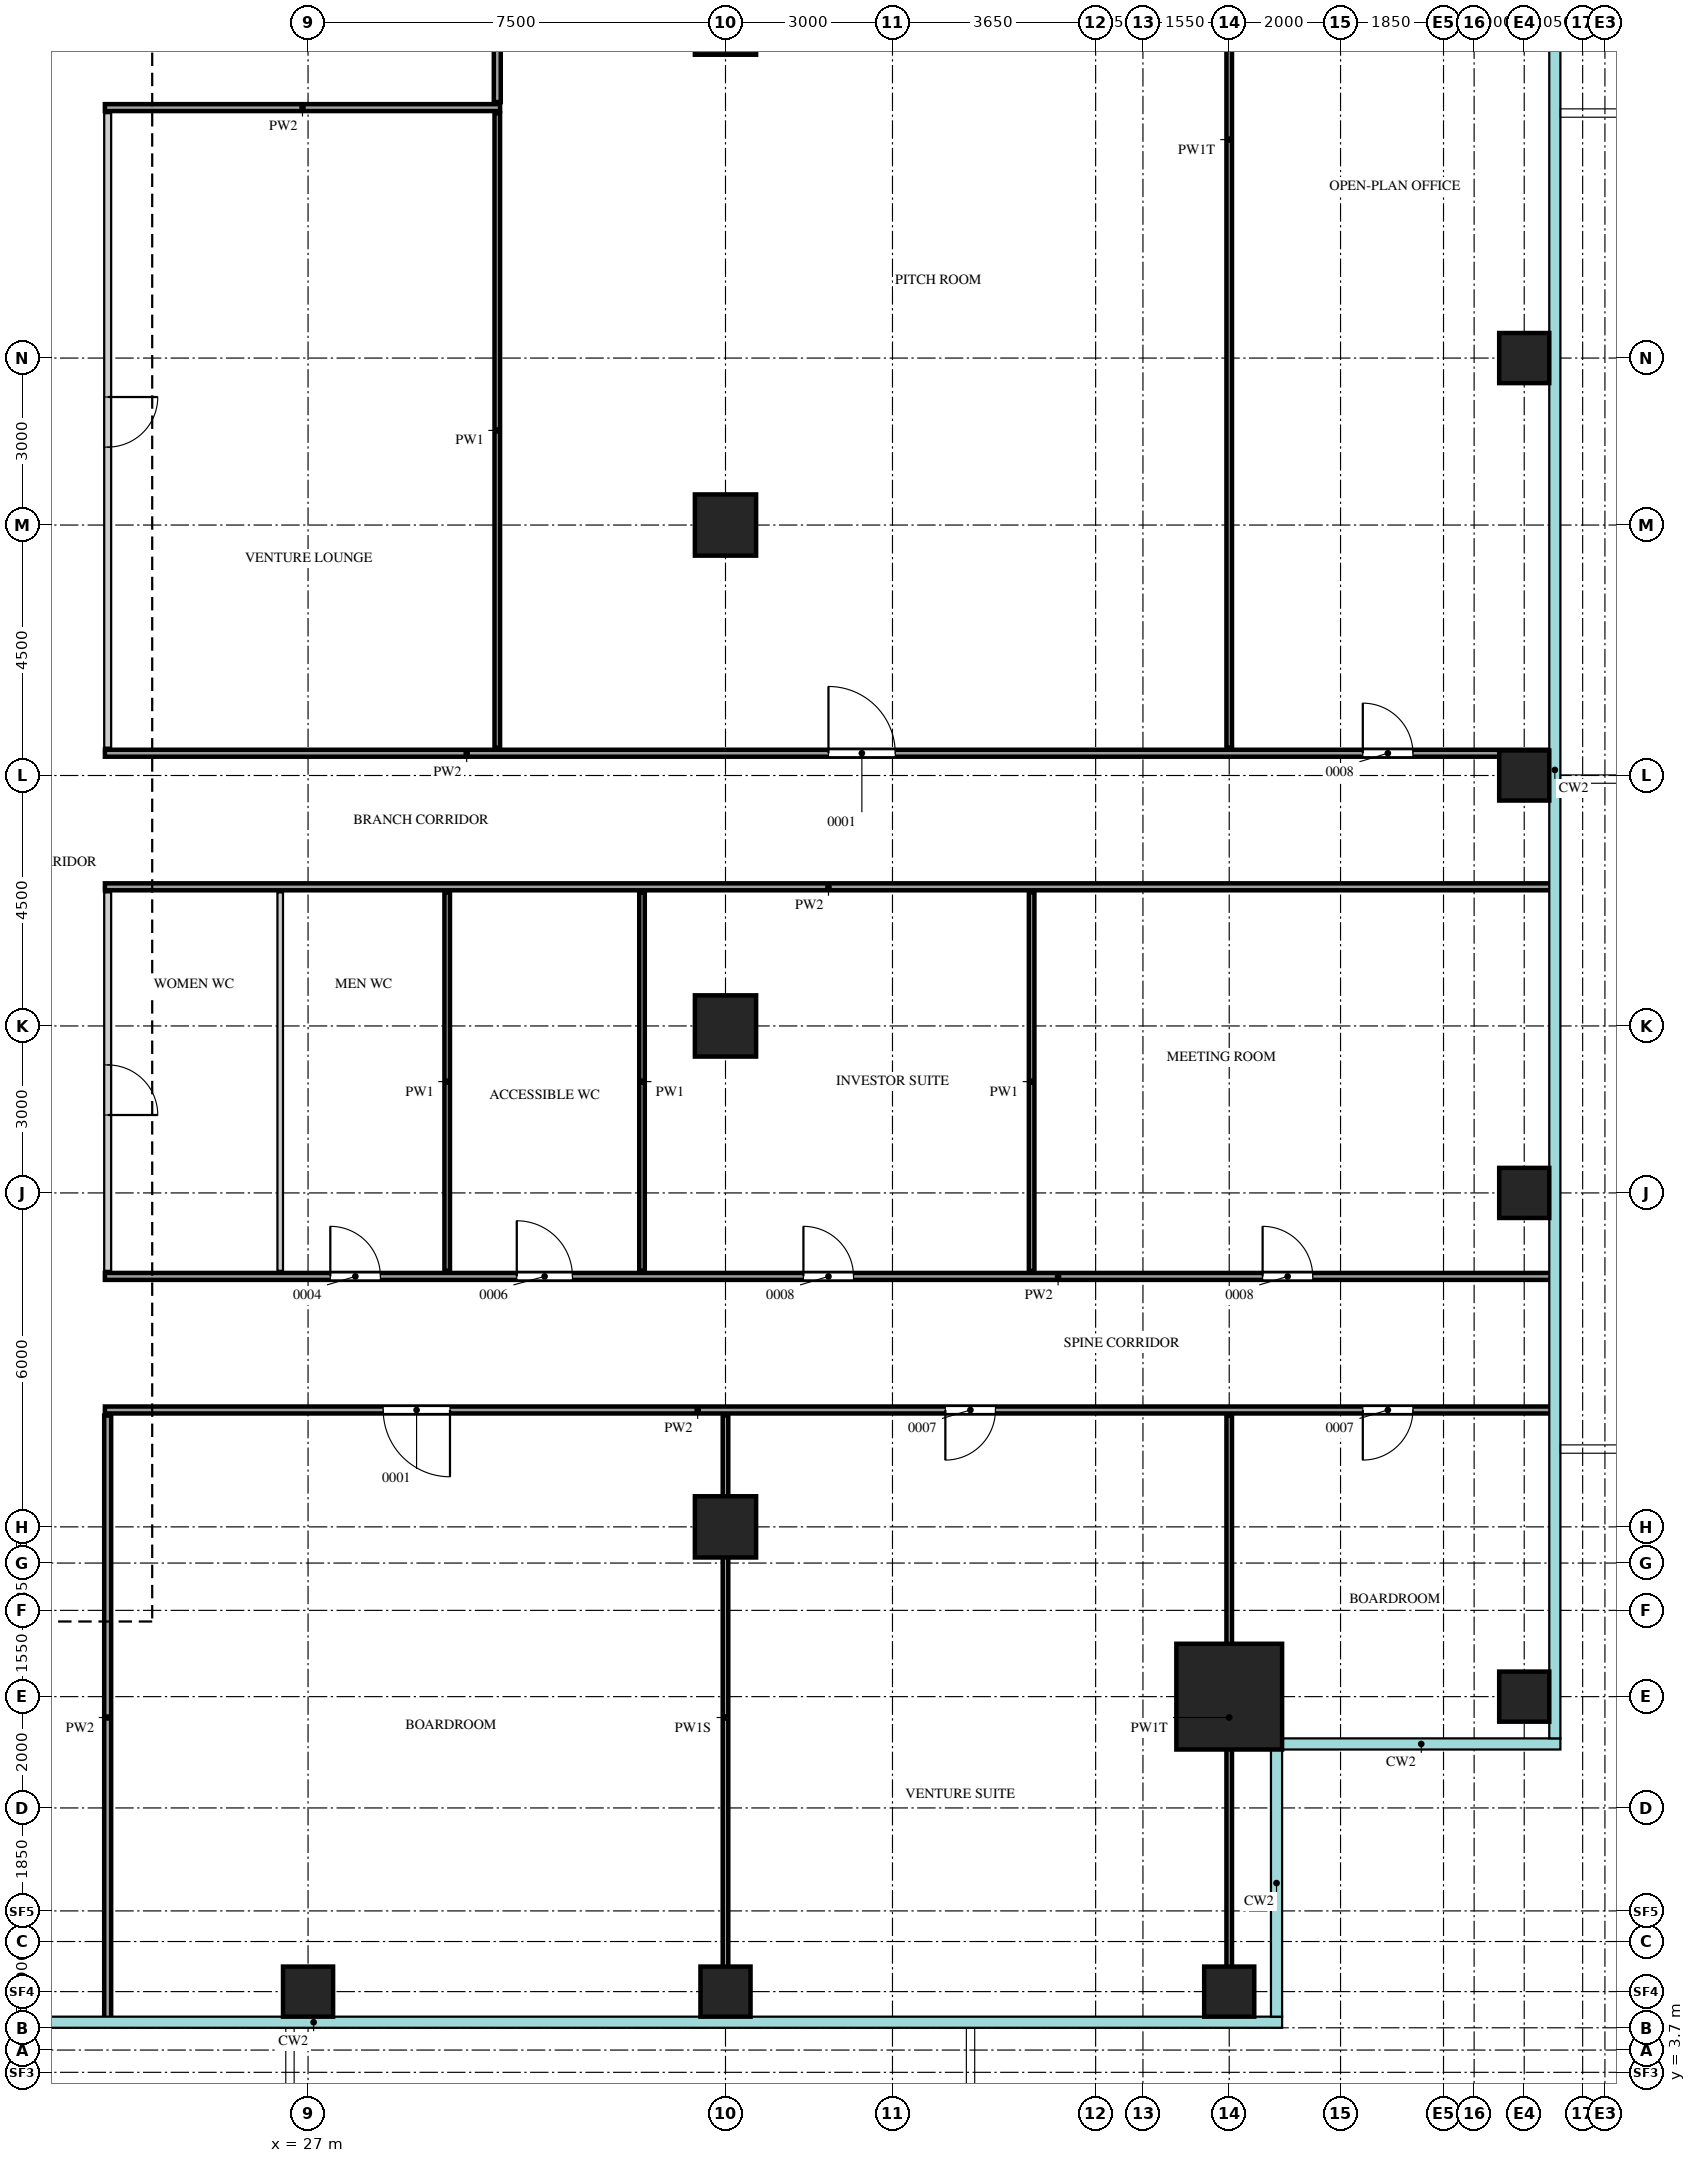
"""IFC4 building model, lengths in metres.
Left out: names, types, materials, properties, quantities, classifications, styles, units other than length and angle.
Written with IfcOpenShell. Run it as: python <this file> out.ifc"""

import sys

from ifc_helpers import new_model, si_unit, direction, frame, frame_2d, origin, origin_2d, place, context, subcontext, project, spatial, rectangle, extrude, source, transform, mapped, element, fill, save


model = new_model("IFC4")
c1 = context("Model", 3, precision=1e-05, world=origin(), true_north=direction((0.0, 1.0)))
c2 = subcontext(c1, "Body", "Model", "MODEL_VIEW")
j1 = project(units=[si_unit("LENGTHUNIT", "METRE"), si_unit("PLANEANGLEUNIT", "RADIAN")], contexts=[c1])
p1 = place(None, origin())
s1 = spatial("IfcSite", under=j1, at=p1, CompositionType="ELEMENT")
p2 = place(p1, origin())
s2 = spatial("IfcBuilding", under=s1, at=p2, CompositionType="ELEMENT")
p3 = place(p2, frame((0.0, 0.0, 242.2)))
s3 = spatial("IfcBuildingStorey", under=s2, at=p3, CompositionType="ELEMENT", Elevation=242.2)
m1 = source(origin(), c2, "Body", "SweptSolid", [
    extrude(rectangle(XDim=1.9, YDim=1.9, at=origin_2d()), origin(), (0.0, 0.0, 1.0), 4.0),
])
p4 = place(p3, frame((43.55, 10.45, 0.0), z_axis=(0.0, 0.0, 1.0), x_axis=(1.0, 0.0, 0.0)))
e1 = element("IfcColumn", 1, at=p4, inside=s3, PredefinedType="COLUMN", context=c2, shape_type="MappedRepresentation", body=[
    mapped(m1, transform((0.0, 0.0, 0.0))),
])
m2 = source(origin(), c2, "Body", "SweptSolid", [
    extrude(rectangle(XDim=0.9, YDim=0.9, at=origin_2d()), origin(), (0.0, 0.0, 1.0), 3.75),
])
for number, where, z_axis, x_axis in (
    (2, (27.0, 5.15, 0.0), (0.0, 0.0, 1.0), (1.0, 0.0, 0.0)),
    (3, (34.5, 5.15, 0.0), (0.0, 0.0, 1.0), (1.0, 0.0, 0.0)),
    (4, (43.55, 5.15, 0.0), (0.0, 0.0, 1.0), (1.0, 0.0, 0.0)),
    (5, (48.85, 10.45, 0.0), (0.0, 0.0, 1.0), (1.0, 0.0, 0.0)),
    (6, (48.85, 19.5, 0.0), (0.0, 0.0, 1.0), (1.0, 0.0, 0.0)),
    (7, (48.85, 27.0, 0.0), (0.0, 0.0, 1.0), (1.0, 0.0, 0.0)),
    (8, (48.85, 34.5, 0.0), (0.0, 0.0, 1.0), (1.0, 0.0, 0.0)),
):
    element("IfcColumn", number, at=place(p3, frame(where, z_axis=z_axis, x_axis=x_axis)), inside=s3, PredefinedType="COLUMN", context=c2, shape_type="MappedRepresentation", body=[
        mapped(m2, transform((0.0, 0.0, 0.0))),
    ])
m3 = source(origin(), c2, "Body", "SweptSolid", [
    extrude(rectangle(XDim=1.1, YDim=1.1, at=origin_2d()), origin(), (0.0, 0.0, 1.0), 3.75),
])
for number, where, z_axis, x_axis in (
    (9, (34.5, 13.5, 0.0), (0.0, 0.0, 1.0), (1.0, 0.0, 0.0)),
    (10, (34.5, 22.5, 0.0), (0.0, 0.0, 1.0), (1.0, 0.0, 0.0)),
    (11, (34.5, 31.5, 0.0), (0.0, 0.0, 1.0), (1.0, 0.0, 0.0)),
    (12, (34.5, 40.5, 0.0), (0.0, 0.0, 1.0), (1.0, 0.0, 0.0)),
):
    element("IfcColumn", number, at=place(p3, frame(where, z_axis=z_axis, x_axis=x_axis)), inside=s3, PredefinedType="COLUMN", context=c2, shape_type="MappedRepresentation", body=[
        mapped(m3, transform((0.0, 0.0, 0.0))),
    ])
m4 = source(origin(), c2, "Body", "SweptSolid", [
    extrude(rectangle(XDim=10.85, YDim=0.125, at=frame_2d((5.425, 0.0))), origin(), (0.0, 0.0, 1.0), 3.8),
])
p5 = place(p3, frame((23.4, 4.65, 0.0), z_axis=(0.0, 0.0, 1.0), x_axis=(0.0, 1.0, 0.0)))
e13 = element("IfcWall", 13, at=p5, inside=s3, PredefinedType="PARTITIONING", context=c2, shape_type="MappedRepresentation", body=[
    mapped(m4, transform((0.0, 0.0, 0.0))),
])
m5 = source(origin(), c2, "Body", "SweptSolid", [
    extrude(rectangle(XDim=10.85, YDim=0.1, at=frame_2d((5.425, 0.0))), origin(), (0.0, 0.0, 1.0), 3.35),
])
p6 = place(p3, frame((34.5, 4.65, 0.0), z_axis=(0.0, 0.0, 1.0), x_axis=(0.0, 1.0, 0.0)))
e14 = element("IfcWall", 14, at=p6, inside=s3, PredefinedType="PARTITIONING", context=c2, shape_type="MappedRepresentation", body=[
    mapped(m5, transform((0.0, 0.0, 0.0))),
])
m6 = source(origin(), c2, "Body", "SweptSolid", [
    extrude(rectangle(XDim=10.85, YDim=0.1, at=frame_2d((5.425, 0.0))), origin(), (0.0, 0.0, 1.0), 3.3),
])
p7 = place(p3, frame((43.55, 4.65, 0.0), z_axis=(0.0, 0.0, 1.0), x_axis=(0.0, 1.0, 0.0)))
e15 = element("IfcWall", 15, at=p7, inside=s3, PredefinedType="PARTITIONING", context=c2, shape_type="MappedRepresentation", body=[
    mapped(m6, transform((0.0, 0.0, 0.0))),
])
m7 = source(origin(), c2, "Body", "SweptSolid", [
    extrude(rectangle(XDim=26.0, YDim=0.125, at=frame_2d((13.0, 0.0))), origin(), (0.0, 0.0, 1.0), 3.8),
])
p8 = place(p3, frame((23.35, 15.6, 0.0), z_axis=(0.0, 0.0, 1.0), x_axis=(1.0, 0.0, 0.0)))
e16 = element("IfcWall", 16, at=p8, inside=s3, PredefinedType="PARTITIONING", context=c2, shape_type="MappedRepresentation", body=[
    mapped(m7, transform((0.0, 0.0, 0.0))),
])
m8 = source(origin(), c2, "Body", "SweptSolid", [
    extrude(rectangle(XDim=1.2, YDim=2.1, at=frame_2d((0.6, 1.05))), frame((0.0, 0.073, 0.0), z_axis=(0.0, -1.0, 0.0), x_axis=(1.0, 0.0, 0.0)), (0.0, 0.0, 1.0), 0.145),
])
p9 = place(p8, frame((5.0, 0.0, 0.0)))
e17 = element("IfcOpeningElement", 17, at=p9, cuts=e16, PredefinedType="OPENING", context=c2, shape_type="MappedRepresentation", body=[
    mapped(m8, transform((0.0, 0.0, 0.0))),
])
m9 = source(origin(), c2, "Body", "SweptSolid", [
    extrude(rectangle(XDim=0.9, YDim=2.1, at=frame_2d((0.45, 1.05))), frame((0.0, 0.073, 0.0), z_axis=(0.0, -1.0, 0.0), x_axis=(1.0, 0.0, 0.0)), (0.0, 0.0, 1.0), 0.145),
])
p10 = place(p8, frame((15.1, 0.0, 0.0)))
e18 = element("IfcOpeningElement", 18, at=p10, cuts=e16, PredefinedType="OPENING", context=c2, shape_type="MappedRepresentation", body=[
    mapped(m9, transform((0.0, 0.0, 0.0))),
])
p11 = place(p8, frame((22.6, 0.0, 0.0)))
e19 = element("IfcOpeningElement", 19, at=p11, cuts=e16, PredefinedType="OPENING", context=c2, shape_type="MappedRepresentation", body=[
    mapped(m9, transform((0.0, 0.0, 0.0))),
])
p12 = place(p3, frame((23.35, 18.0, 0.0), z_axis=(0.0, 0.0, 1.0), x_axis=(1.0, 0.0, 0.0)))
e20 = element("IfcWall", 20, at=p12, inside=s3, PredefinedType="PARTITIONING", context=c2, shape_type="MappedRepresentation", body=[
    mapped(m7, transform((0.0, 0.0, 0.0))),
])
p13 = place(p12, frame((4.05, 0.0, 0.0)))
e21 = element("IfcOpeningElement", 21, at=p13, cuts=e20, PredefinedType="OPENING", context=c2, shape_type="MappedRepresentation", body=[
    mapped(m9, transform((0.0, 0.0, 0.0))),
])
m10 = source(origin(), c2, "Body", "SweptSolid", [
    extrude(rectangle(XDim=1.0, YDim=2.1, at=frame_2d((0.5, 1.05))), frame((0.0, 0.073, 0.0), z_axis=(0.0, -1.0, 0.0), x_axis=(1.0, 0.0, 0.0)), (0.0, 0.0, 1.0), 0.145),
])
p14 = place(p12, frame((7.4, 0.0, 0.0)))
e22 = element("IfcOpeningElement", 22, at=p14, cuts=e20, PredefinedType="OPENING", context=c2, shape_type="MappedRepresentation", body=[
    mapped(m10, transform((0.0, 0.0, 0.0))),
])
p15 = place(p12, frame((12.55, 0.0, 0.0)))
e23 = element("IfcOpeningElement", 23, at=p15, cuts=e20, PredefinedType="OPENING", context=c2, shape_type="MappedRepresentation", body=[
    mapped(m9, transform((0.0, 0.0, 0.0))),
])
p16 = place(p12, frame((20.8, 0.0, 0.0)))
e24 = element("IfcOpeningElement", 24, at=p16, cuts=e20, PredefinedType="OPENING", context=c2, shape_type="MappedRepresentation", body=[
    mapped(m9, transform((0.0, 0.0, 0.0))),
])
m11 = source(origin(), c2, "Body", "SweptSolid", [
    extrude(rectangle(XDim=6.8, YDim=0.125, at=frame_2d((3.4, 0.0))), origin(), (0.0, 0.0, 1.0), 3.8),
])
p17 = place(p3, frame((23.4, 18.1, 0.0), z_axis=(0.0, 0.0, 1.0), x_axis=(0.0, 1.0, 0.0)))
e25 = element("IfcWall", 25, at=p17, inside=s3, PredefinedType="PARTITIONING", context=c2, shape_type="MappedRepresentation", body=[
    mapped(m11, transform((0.0, 0.0, 0.0))),
])
p18 = place(p17, frame((2.8, 0.0, 0.0)))
e26 = element("IfcOpeningElement", 26, at=p18, cuts=e25, PredefinedType="OPENING", context=c2, shape_type="MappedRepresentation", body=[
    mapped(m9, transform((0.0, 0.0, 0.0))),
])
m12 = source(origin(), c2, "Body", "SweptSolid", [
    extrude(rectangle(XDim=6.8, YDim=0.1, at=frame_2d((3.4, 0.0))), origin(), (0.0, 0.0, 1.0), 3.8),
])
for number, where, z_axis, x_axis in (
    (27, (26.5, 18.1, 0.0), (0.0, 0.0, 1.0), (0.0, 1.0, 0.0)),
    (28, (29.5, 18.1, 0.0), (0.0, 0.0, 1.0), (0.0, 1.0, 0.0)),
    (29, (33.0, 18.1, 0.0), (0.0, 0.0, 1.0), (0.0, 1.0, 0.0)),
    (30, (40.0, 18.1, 0.0), (0.0, 0.0, 1.0), (0.0, 1.0, 0.0)),
):
    element("IfcWall", number, at=place(p3, frame(where, z_axis=z_axis, x_axis=x_axis)), inside=s3, PredefinedType="PARTITIONING", context=c2, shape_type="MappedRepresentation", body=[
        mapped(m12, transform((0.0, 0.0, 0.0))),
    ])
p19 = place(p3, frame((23.35, 25.0, 0.0), z_axis=(0.0, 0.0, 1.0), x_axis=(1.0, 0.0, 0.0)))
e31 = element("IfcWall", 31, at=p19, inside=s3, PredefinedType="PARTITIONING", context=c2, shape_type="MappedRepresentation", body=[
    mapped(m7, transform((0.0, 0.0, 0.0))),
])
p20 = place(p3, frame((23.35, 27.4, 0.0), z_axis=(0.0, 0.0, 1.0), x_axis=(1.0, 0.0, 0.0)))
e32 = element("IfcWall", 32, at=p20, inside=s3, PredefinedType="PARTITIONING", context=c2, shape_type="MappedRepresentation", body=[
    mapped(m7, transform((0.0, 0.0, 0.0))),
])
p21 = place(p20, frame((13.0, 0.0, 0.0)))
e33 = element("IfcOpeningElement", 33, at=p21, cuts=e32, PredefinedType="OPENING", context=c2, shape_type="MappedRepresentation", body=[
    mapped(m8, transform((0.0, 0.0, 0.0))),
])
p22 = place(p20, frame((22.6, 0.0, 0.0)))
e34 = element("IfcOpeningElement", 34, at=p22, cuts=e32, PredefinedType="OPENING", context=c2, shape_type="MappedRepresentation", body=[
    mapped(m9, transform((0.0, 0.0, 0.0))),
])
m13 = source(origin(), c2, "Body", "SweptSolid", [
    extrude(rectangle(XDim=11.4, YDim=0.125, at=frame_2d((5.7, 0.0))), origin(), (0.0, 0.0, 1.0), 3.8),
])
p23 = place(p3, frame((23.4, 27.5, 0.0), z_axis=(0.0, 0.0, 1.0), x_axis=(0.0, 1.0, 0.0)))
e35 = element("IfcWall", 35, at=p23, inside=s3, PredefinedType="PARTITIONING", context=c2, shape_type="MappedRepresentation", body=[
    mapped(m13, transform((0.0, 0.0, 0.0))),
])
p24 = place(p23, frame((5.4, 0.0, 0.0)))
e36 = element("IfcOpeningElement", 36, at=p24, cuts=e35, PredefinedType="OPENING", context=c2, shape_type="MappedRepresentation", body=[
    mapped(m9, transform((0.0, 0.0, 0.0))),
])
m14 = source(origin(), c2, "Body", "SweptSolid", [
    extrude(rectangle(XDim=11.4, YDim=0.1, at=frame_2d((5.7, 0.0))), origin(), (0.0, 0.0, 1.0), 3.8),
])
p25 = place(p3, frame((30.4, 27.5, 0.0), z_axis=(0.0, 0.0, 1.0), x_axis=(0.0, 1.0, 0.0)))
e37 = element("IfcWall", 37, at=p25, inside=s3, PredefinedType="PARTITIONING", context=c2, shape_type="MappedRepresentation", body=[
    mapped(m14, transform((0.0, 0.0, 0.0))),
])
m15 = source(origin(), c2, "Body", "SweptSolid", [
    extrude(rectangle(XDim=21.85, YDim=0.1, at=frame_2d((10.925, 0.0))), origin(), (0.0, 0.0, 1.0), 3.3),
])
p26 = place(p3, frame((43.55, 27.5, 0.0), z_axis=(0.0, 0.0, 1.0), x_axis=(0.0, 1.0, 0.0)))
e38 = element("IfcWall", 38, at=p26, inside=s3, PredefinedType="PARTITIONING", context=c2, shape_type="MappedRepresentation", body=[
    mapped(m15, transform((0.0, 0.0, 0.0))),
])
m16 = source(origin(), c2, "Body", "SweptSolid", [
    extrude(rectangle(XDim=7.1, YDim=0.125, at=frame_2d((3.55, 0.0))), origin(), (0.0, 0.0, 1.0), 3.8),
])
p27 = place(p3, frame((23.35, 39.0, 0.0), z_axis=(0.0, 0.0, 1.0), x_axis=(1.0, 0.0, 0.0)))
e39 = element("IfcWall", 39, at=p27, inside=s3, PredefinedType="PARTITIONING", context=c2, shape_type="MappedRepresentation", body=[
    mapped(m16, transform((0.0, 0.0, 0.0))),
])
m17 = source(origin(), c2, "Body", "SweptSolid", [
    extrude(rectangle(XDim=6.6, YDim=0.125, at=frame_2d((3.3, 0.0))), origin(), (0.0, 0.0, 1.0), 3.8),
])
p28 = place(p3, frame((30.4, 39.1, 0.0), z_axis=(0.0, 0.0, 1.0), x_axis=(0.0, 1.0, 0.0)))
e40 = element("IfcWall", 40, at=p28, inside=s3, PredefinedType="PARTITIONING", context=c2, shape_type="MappedRepresentation", body=[
    mapped(m17, transform((0.0, 0.0, 0.0))),
])
m18 = source(origin(), c2, "Body", "SweptSolid", [
    extrude(rectangle(XDim=1.2, YDim=2.1, at=frame_2d((0.6, 1.05))), frame((0.0, 0.025, 0.0), z_axis=(0.0, -1.0, 0.0), x_axis=(1.0, 0.0, 0.0)), (0.0, 0.0, 1.0), 0.05),
])
p29 = place(p9, origin())
e41 = element("IfcDoor", 41, at=p29, inside=s3, OperationType="SINGLE_SWING_RIGHT", PredefinedType="DOOR", context=c2, shape_type="MappedRepresentation", body=[
    mapped(m18, transform((0.0, 0.0, 0.0))),
])
fill(e17, e41)
m19 = source(origin(), c2, "Body", "SweptSolid", [
    extrude(rectangle(XDim=0.9, YDim=2.1, at=frame_2d((0.45, 1.05))), frame((0.0, 0.025, 0.0), z_axis=(0.0, -1.0, 0.0), x_axis=(1.0, 0.0, 0.0)), (0.0, 0.0, 1.0), 0.05),
])
p30 = place(p10, origin())
e42 = element("IfcDoor", 42, at=p30, inside=s3, OperationType="SINGLE_SWING_LEFT", PredefinedType="DOOR", context=c2, shape_type="MappedRepresentation", body=[
    mapped(m19, transform((0.0, 0.0, 0.0))),
])
fill(e18, e42)
p31 = place(p11, origin())
e43 = element("IfcDoor", 43, at=p31, inside=s3, OperationType="SINGLE_SWING_LEFT", PredefinedType="DOOR", context=c2, shape_type="MappedRepresentation", body=[
    mapped(m19, transform((0.0, 0.0, 0.0))),
])
fill(e19, e43)
p32 = place(p18, origin())
e44 = element("IfcDoor", 44, at=p32, inside=s3, OperationType="SINGLE_SWING_LEFT", PredefinedType="DOOR", context=c2, shape_type="MappedRepresentation", body=[
    mapped(m19, transform((0.0, 0.0, 0.0))),
])
fill(e26, e44)
p33 = place(p13, origin())
e45 = element("IfcDoor", 45, at=p33, inside=s3, OperationType="SINGLE_SWING_RIGHT", PredefinedType="DOOR", context=c2, shape_type="MappedRepresentation", body=[
    mapped(m19, transform((0.0, 0.0, 0.0))),
])
fill(e21, e45)
m20 = source(origin(), c2, "Body", "SweptSolid", [
    extrude(rectangle(XDim=1.0, YDim=2.1, at=frame_2d((0.5, 1.05))), frame((0.0, 0.025, 0.0), z_axis=(0.0, -1.0, 0.0), x_axis=(1.0, 0.0, 0.0)), (0.0, 0.0, 1.0), 0.05),
])
p34 = place(p14, origin())
e46 = element("IfcDoor", 46, at=p34, inside=s3, OperationType="SINGLE_SWING_RIGHT", PredefinedType="DOOR", context=c2, shape_type="MappedRepresentation", body=[
    mapped(m20, transform((0.0, 0.0, 0.0))),
])
fill(e22, e46)
p35 = place(p15, origin())
e47 = element("IfcDoor", 47, at=p35, inside=s3, OperationType="SINGLE_SWING_RIGHT", PredefinedType="DOOR", context=c2, shape_type="MappedRepresentation", body=[
    mapped(m19, transform((0.0, 0.0, 0.0))),
])
fill(e23, e47)
p36 = place(p16, origin())
e48 = element("IfcDoor", 48, at=p36, inside=s3, OperationType="SINGLE_SWING_RIGHT", PredefinedType="DOOR", context=c2, shape_type="MappedRepresentation", body=[
    mapped(m19, transform((0.0, 0.0, 0.0))),
])
fill(e24, e48)
p37 = place(p24, origin())
e49 = element("IfcDoor", 49, at=p37, inside=s3, OperationType="SINGLE_SWING_RIGHT", PredefinedType="DOOR", context=c2, shape_type="MappedRepresentation", body=[
    mapped(m19, transform((0.0, 0.0, 0.0))),
])
fill(e36, e49)
p38 = place(p21, origin())
e50 = element("IfcDoor", 50, at=p38, inside=s3, OperationType="SINGLE_SWING_RIGHT", PredefinedType="DOOR", context=c2, shape_type="MappedRepresentation", body=[
    mapped(m18, transform((0.0, 0.0, 0.0))),
])
fill(e33, e50)
p39 = place(p22, origin())
e51 = element("IfcDoor", 51, at=p39, inside=s3, OperationType="SINGLE_SWING_RIGHT", PredefinedType="DOOR", context=c2, shape_type="MappedRepresentation", body=[
    mapped(m19, transform((0.0, 0.0, 0.0))),
])
fill(e34, e51)
save(model, sys.argv[1])
